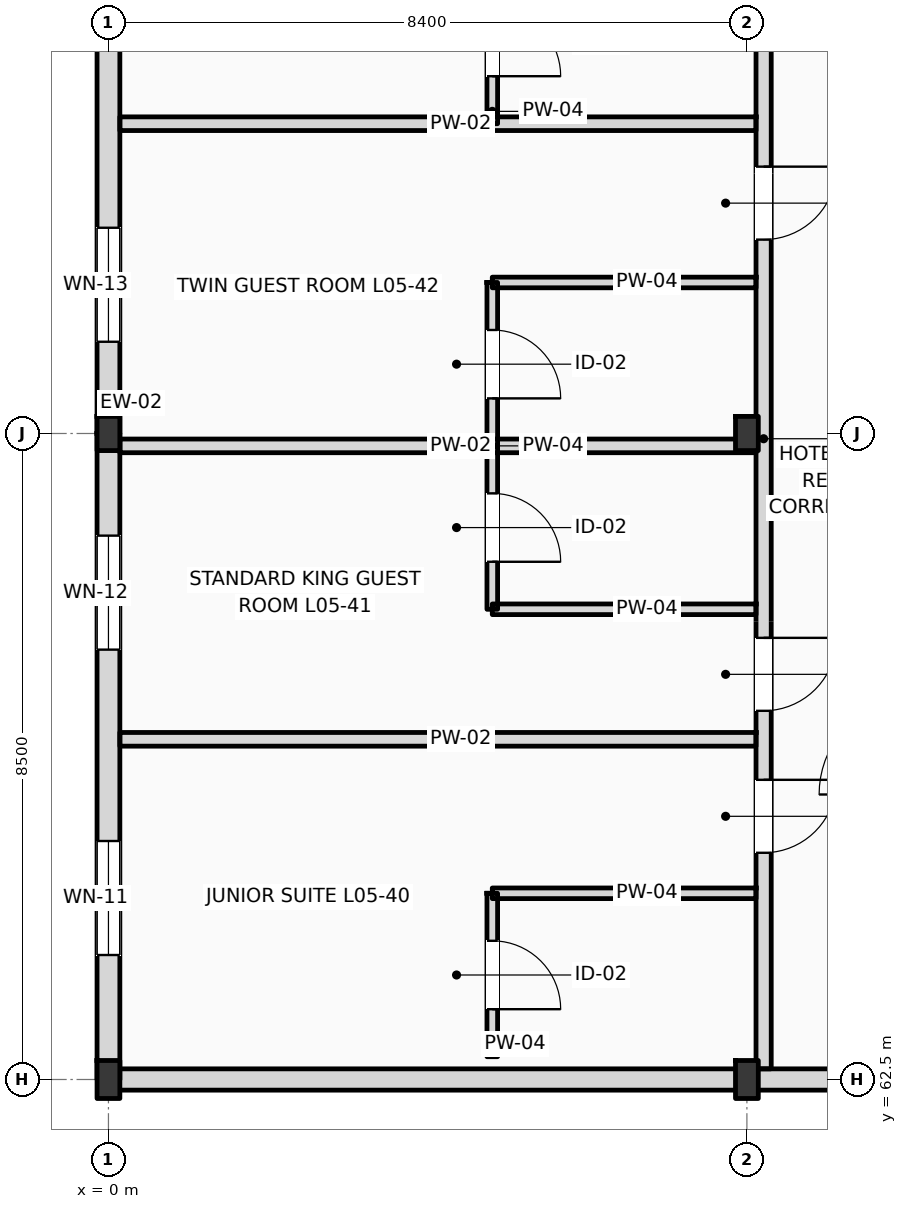
"""IFC4 building model, lengths in metres.
Left out: names, types, materials, properties, quantities, classifications, styles, units other than length and angle.
Written with IfcOpenShell. Run it as: python <this file> out.ifc"""

import sys

from ifc_helpers import new_model, si_unit, direction, frame, frame_2d, origin, origin_2d, place, context, subcontext, project, spatial, rectangle, i_section, extrude, element, fill, save


model = new_model("IFC4")
c1 = context("Model", 3, precision=1e-05, world=origin(), true_north=direction((0.0, 1.0)))
c2 = subcontext(c1, "Body", "Model", "MODEL_VIEW")
j1 = project(units=[si_unit("LENGTHUNIT", "METRE"), si_unit("PLANEANGLEUNIT", "RADIAN")], contexts=[c1])
p1 = place(None, origin())
s1 = spatial("IfcSite", under=j1, at=p1, CompositionType="ELEMENT")
p2 = place(p1, origin())
s2 = spatial("IfcBuilding", under=s1, at=p2, CompositionType="ELEMENT")
p3 = place(p2, frame((0.0, 0.0, 24.6)))
s3 = spatial("IfcBuildingStorey", under=s2, at=p3, CompositionType="ELEMENT", Elevation=24.6)
p4 = place(p3, frame((0.0, 62.5, 0.0), z_axis=(0.0, 0.0, 1.0), x_axis=(1.0, 0.0, 0.0)))
e1 = element("IfcColumn", 1, at=p4, inside=s3, PredefinedType="COLUMN", context=c2, shape_type="SweptSolid", body=[
    extrude(i_section(OverallWidth=0.3, OverallDepth=0.5, WebThickness=0.014, FlangeThickness=0.028, FilletRadius=0.027, at=origin_2d()), origin(), (0.0, 0.0, 1.0), 3.6),
])
p5 = place(p3, frame((0.0, 71.0, 0.0), z_axis=(0.0, 0.0, 1.0), x_axis=(1.0, 0.0, 0.0)))
e2 = element("IfcColumn", 2, at=p5, inside=s3, PredefinedType="COLUMN", context=c2, shape_type="SweptSolid", body=[
    extrude(i_section(OverallWidth=0.3, OverallDepth=0.45, WebThickness=0.014, FlangeThickness=0.026, FilletRadius=0.027, at=origin_2d()), origin(), (0.0, 0.0, 1.0), 3.6),
])
p6 = place(p3, frame((8.4, 62.5, 0.0), z_axis=(0.0, 0.0, 1.0), x_axis=(1.0, 0.0, 0.0)))
e3 = element("IfcColumn", 3, at=p6, inside=s3, PredefinedType="COLUMN", context=c2, shape_type="SweptSolid", body=[
    extrude(i_section(OverallWidth=0.3, OverallDepth=0.5, WebThickness=0.014, FlangeThickness=0.028, FilletRadius=0.027, at=origin_2d()), origin(), (0.0, 0.0, 1.0), 3.6),
])
p7 = place(p3, frame((8.4, 71.0, 0.0), z_axis=(0.0, 0.0, 1.0), x_axis=(1.0, 0.0, 0.0)))
e4 = element("IfcColumn", 4, at=p7, inside=s3, PredefinedType="COLUMN", context=c2, shape_type="SweptSolid", body=[
    extrude(i_section(OverallWidth=0.3, OverallDepth=0.45, WebThickness=0.014, FlangeThickness=0.026, FilletRadius=0.027, at=origin_2d()), origin(), (0.0, 0.0, 1.0), 3.6),
])
p8 = place(p3, frame((0.0, 62.5, 0.0), z_axis=(0.0, 0.0, 1.0), x_axis=(0.0, 1.0, 0.0)))
e5 = element("IfcWall", 5, at=p8, inside=s3, PredefinedType="STANDARD", context=c2, shape_type="SweptSolid", body=[
    extrude(rectangle(XDim=8.5, YDim=0.3, at=frame_2d((4.25, 0.0))), origin(), (0.0, 0.0, 1.0), 2.93),
])
p9 = place(p8, frame((1.638, 0.0, 0.9)))
e6 = element("IfcOpeningElement", 6, at=p9, cuts=e5, PredefinedType="OPENING", context=c2, shape_type="SweptSolid", body=[
    extrude(rectangle(XDim=1.5, YDim=1.85, at=frame_2d((0.75, 0.925))), frame((0.0, 0.16, 0.0), z_axis=(0.0, -1.0, 0.0), x_axis=(1.0, 0.0, 0.0)), (0.0, 0.0, 1.0), 0.32),
])
p10 = place(p8, frame((5.656, 0.0, 0.9)))
e7 = element("IfcOpeningElement", 7, at=p10, cuts=e5, PredefinedType="OPENING", context=c2, shape_type="SweptSolid", body=[
    extrude(rectangle(XDim=1.5, YDim=1.85, at=frame_2d((0.75, 0.925))), frame((0.0, 0.16, 0.0), z_axis=(0.0, -1.0, 0.0), x_axis=(1.0, 0.0, 0.0)), (0.0, 0.0, 1.0), 0.32),
])
p11 = place(p3, frame((0.0, 71.0, 0.0), z_axis=(0.0, 0.0, 1.0), x_axis=(0.0, 1.0, 0.0)))
e8 = element("IfcWall", 8, at=p11, inside=s3, PredefinedType="STANDARD", context=c2, shape_type="SweptSolid", body=[
    extrude(rectangle(XDim=8.5, YDim=0.3, at=frame_2d((4.25, 0.0))), origin(), (0.0, 0.0, 1.0), 2.93),
])
p12 = place(p11, frame((1.207, 0.0, 0.9)))
e9 = element("IfcOpeningElement", 9, at=p12, cuts=e8, PredefinedType="OPENING", context=c2, shape_type="SweptSolid", body=[
    extrude(rectangle(XDim=1.5, YDim=1.85, at=frame_2d((0.75, 0.925))), frame((0.0, 0.16, 0.0), z_axis=(0.0, -1.0, 0.0), x_axis=(1.0, 0.0, 0.0)), (0.0, 0.0, 1.0), 0.32),
])
p13 = place(p11, frame((5.256, 0.0, 0.9)))
e10 = element("IfcOpeningElement", 10, at=p13, cuts=e8, PredefinedType="OPENING", context=c2, shape_type="SweptSolid", body=[
    extrude(rectangle(XDim=1.5, YDim=1.85, at=frame_2d((0.75, 0.925))), frame((0.0, 0.16, 0.0), z_axis=(0.0, -1.0, 0.0), x_axis=(1.0, 0.0, 0.0)), (0.0, 0.0, 1.0), 0.32),
])
p14 = place(p3, frame((0.0, 62.5, 0.0), z_axis=(0.0, 0.0, 1.0), x_axis=(1.0, 0.0, 0.0)))
e11 = element("IfcWall", 11, at=p14, inside=s3, PredefinedType="STANDARD", context=c2, shape_type="SweptSolid", body=[
    extrude(rectangle(XDim=25.2, YDim=0.28, at=frame_2d((12.6, 0.0))), origin(), (0.0, 0.0, 1.0), 2.78),
])
p15 = place(p3, frame((8.62, 62.64, 0.0), z_axis=(0.0, 0.0, 1.0), x_axis=(0.0, 1.0, 0.0)))
e12 = element("IfcWall", 12, at=p15, inside=s3, PredefinedType="PARTITIONING", context=c2, shape_type="SweptSolid", body=[
    extrude(rectangle(XDim=32.66, YDim=0.2, at=frame_2d((16.33, 0.0))), origin(), (0.0, 0.0, 1.0), 2.93),
])
p16 = place(p15, frame((2.843, 0.0, 0.0)))
e13 = element("IfcOpeningElement", 13, at=p16, cuts=e12, PredefinedType="OPENING", context=c2, shape_type="SweptSolid", body=[
    extrude(rectangle(XDim=0.96, YDim=2.2, at=frame_2d((0.48, 1.1))), frame((0.0, 0.11, 0.0), z_axis=(0.0, -1.0, 0.0), x_axis=(1.0, 0.0, 0.0)), (0.0, 0.0, 1.0), 0.22),
])
p17 = place(p15, frame((4.711, 0.0, 0.0)))
e14 = element("IfcOpeningElement", 14, at=p17, cuts=e12, PredefinedType="OPENING", context=c2, shape_type="SweptSolid", body=[
    extrude(rectangle(XDim=0.96, YDim=2.2, at=frame_2d((0.48, 1.1))), frame((0.0, 0.11, 0.0), z_axis=(0.0, -1.0, 0.0), x_axis=(1.0, 0.0, 0.0)), (0.0, 0.0, 1.0), 0.22),
])
p18 = place(p15, frame((10.911, 0.0, 0.0)))
e15 = element("IfcOpeningElement", 15, at=p18, cuts=e12, PredefinedType="OPENING", context=c2, shape_type="SweptSolid", body=[
    extrude(rectangle(XDim=0.96, YDim=2.2, at=frame_2d((0.48, 1.1))), frame((0.0, 0.11, 0.0), z_axis=(0.0, -1.0, 0.0), x_axis=(1.0, 0.0, 0.0)), (0.0, 0.0, 1.0), 0.22),
])
p19 = place(p15, frame((14.961, 0.0, 0.0)))
e16 = element("IfcOpeningElement", 16, at=p19, cuts=e12, PredefinedType="OPENING", context=c2, shape_type="SweptSolid", body=[
    extrude(rectangle(XDim=0.96, YDim=2.2, at=frame_2d((0.48, 1.1))), frame((0.0, 0.11, 0.0), z_axis=(0.0, -1.0, 0.0), x_axis=(1.0, 0.0, 0.0)), (0.0, 0.0, 1.0), 0.22),
])
p20 = place(p15, frame((19.012, 0.0, 0.0)))
e17 = element("IfcOpeningElement", 17, at=p20, cuts=e12, PredefinedType="OPENING", context=c2, shape_type="SweptSolid", body=[
    extrude(rectangle(XDim=0.96, YDim=2.2, at=frame_2d((0.48, 1.1))), frame((0.0, 0.11, 0.0), z_axis=(0.0, -1.0, 0.0), x_axis=(1.0, 0.0, 0.0)), (0.0, 0.0, 1.0), 0.22),
])
p21 = place(p15, frame((23.061, 0.0, 0.0)))
e18 = element("IfcOpeningElement", 18, at=p21, cuts=e12, PredefinedType="OPENING", context=c2, shape_type="SweptSolid", body=[
    extrude(rectangle(XDim=0.96, YDim=2.2, at=frame_2d((0.48, 1.1))), frame((0.0, 0.11, 0.0), z_axis=(0.0, -1.0, 0.0), x_axis=(1.0, 0.0, 0.0)), (0.0, 0.0, 1.0), 0.22),
])
p22 = place(p15, frame((27.111, 0.0, 0.0)))
e19 = element("IfcOpeningElement", 19, at=p22, cuts=e12, PredefinedType="OPENING", context=c2, shape_type="SweptSolid", body=[
    extrude(rectangle(XDim=0.96, YDim=2.2, at=frame_2d((0.48, 1.1))), frame((0.0, 0.11, 0.0), z_axis=(0.0, -1.0, 0.0), x_axis=(1.0, 0.0, 0.0)), (0.0, 0.0, 1.0), 0.22),
])
p23 = place(p15, frame((31.193, 0.0, 0.0)))
e20 = element("IfcOpeningElement", 20, at=p23, cuts=e12, PredefinedType="OPENING", context=c2, shape_type="SweptSolid", body=[
    extrude(rectangle(XDim=0.96, YDim=2.2, at=frame_2d((0.48, 1.1))), frame((0.0, 0.11, 0.0), z_axis=(0.0, -1.0, 0.0), x_axis=(1.0, 0.0, 0.0)), (0.0, 0.0, 1.0), 0.22),
])
p24 = place(p3, frame((0.15, 66.976, 0.0), z_axis=(0.0, 0.0, 1.0), x_axis=(1.0, 0.0, 0.0)))
e21 = element("IfcWall", 21, at=p24, inside=s3, PredefinedType="PARTITIONING", context=c2, shape_type="SweptSolid", body=[
    extrude(rectangle(XDim=8.37, YDim=0.18, at=frame_2d((4.185, 0.0))), origin(), (0.0, 0.0, 1.0), 3.34),
])
p25 = place(p3, frame((5.05, 64.95, 0.0), z_axis=(0.0, 0.0, 1.0), x_axis=(1.0, 0.0, 0.0)))
e22 = element("IfcWall", 22, at=p25, inside=s3, PredefinedType="PARTITIONING", context=c2, shape_type="SweptSolid", body=[
    extrude(rectangle(XDim=3.47, YDim=0.14, at=frame_2d((1.735, 0.0))), origin(), (0.0, 0.0, 1.0), 3.34),
])
p26 = place(p3, frame((5.05, 62.8, 0.0), z_axis=(0.0, 0.0, 1.0), x_axis=(0.0, 1.0, 0.0)))
e23 = element("IfcWall", 23, at=p26, inside=s3, PredefinedType="PARTITIONING", context=c2, shape_type="SweptSolid", body=[
    extrude(rectangle(XDim=2.15, YDim=0.14, at=frame_2d((1.075, 0.0))), origin(), (0.0, 0.0, 1.0), 3.34),
])
p27 = place(p26, frame((0.625, 0.0, 0.0)))
e24 = element("IfcOpeningElement", 24, at=p27, cuts=e23, PredefinedType="OPENING", context=c2, shape_type="SweptSolid", body=[
    extrude(rectangle(XDim=0.9, YDim=2.1, at=frame_2d((0.45, 1.05))), frame((0.0, 0.08, 0.0), z_axis=(0.0, -1.0, 0.0), x_axis=(1.0, 0.0, 0.0)), (0.0, 0.0, 1.0), 0.16),
])
p28 = place(p3, frame((0.15, 70.837, 0.0), z_axis=(0.0, 0.0, 1.0), x_axis=(1.0, 0.0, 0.0)))
e25 = element("IfcWall", 25, at=p28, inside=s3, PredefinedType="PARTITIONING", context=c2, shape_type="SweptSolid", body=[
    extrude(rectangle(XDim=8.37, YDim=0.18, at=frame_2d((4.185, 0.0))), origin(), (0.0, 0.0, 1.0), 2.78),
])
p29 = place(p3, frame((5.05, 68.687, 0.0), z_axis=(0.0, 0.0, 1.0), x_axis=(1.0, 0.0, 0.0)))
e26 = element("IfcWall", 26, at=p29, inside=s3, PredefinedType="PARTITIONING", context=c2, shape_type="SweptSolid", body=[
    extrude(rectangle(XDim=3.47, YDim=0.14, at=frame_2d((1.735, 0.0))), origin(), (0.0, 0.0, 1.0), 3.34),
])
p30 = place(p3, frame((5.05, 68.687, 0.0), z_axis=(0.0, 0.0, 1.0), x_axis=(0.0, 1.0, 0.0)))
e27 = element("IfcWall", 27, at=p30, inside=s3, PredefinedType="PARTITIONING", context=c2, shape_type="SweptSolid", body=[
    extrude(rectangle(XDim=2.15, YDim=0.14, at=frame_2d((1.075, 0.0))), origin(), (0.0, 0.0, 1.0), 3.34),
])
p31 = place(p30, frame((0.625, 0.0, 0.0)))
e28 = element("IfcOpeningElement", 28, at=p31, cuts=e27, PredefinedType="OPENING", context=c2, shape_type="SweptSolid", body=[
    extrude(rectangle(XDim=0.9, YDim=2.1, at=frame_2d((0.45, 1.05))), frame((0.0, 0.08, 0.0), z_axis=(0.0, -1.0, 0.0), x_axis=(1.0, 0.0, 0.0)), (0.0, 0.0, 1.0), 0.16),
])
p32 = place(p3, frame((0.15, 75.076, 0.0), z_axis=(0.0, 0.0, 1.0), x_axis=(1.0, 0.0, 0.0)))
e29 = element("IfcWall", 29, at=p32, inside=s3, PredefinedType="PARTITIONING", context=c2, shape_type="SweptSolid", body=[
    extrude(rectangle(XDim=8.37, YDim=0.18, at=frame_2d((4.185, 0.0))), origin(), (0.0, 0.0, 1.0), 3.34),
])
p33 = place(p3, frame((5.05, 72.987, 0.0), z_axis=(0.0, 0.0, 1.0), x_axis=(1.0, 0.0, 0.0)))
e30 = element("IfcWall", 30, at=p33, inside=s3, PredefinedType="PARTITIONING", context=c2, shape_type="SweptSolid", body=[
    extrude(rectangle(XDim=3.47, YDim=0.14, at=frame_2d((1.735, 0.0))), origin(), (0.0, 0.0, 1.0), 3.34),
])
p34 = place(p3, frame((5.05, 70.837, 0.0), z_axis=(0.0, 0.0, 1.0), x_axis=(0.0, 1.0, 0.0)))
e31 = element("IfcWall", 31, at=p34, inside=s3, PredefinedType="PARTITIONING", context=c2, shape_type="SweptSolid", body=[
    extrude(rectangle(XDim=2.15, YDim=0.14, at=frame_2d((1.075, 0.0))), origin(), (0.0, 0.0, 1.0), 3.34),
])
p35 = place(p34, frame((0.625, 0.0, 0.0)))
e32 = element("IfcOpeningElement", 32, at=p35, cuts=e31, PredefinedType="OPENING", context=c2, shape_type="SweptSolid", body=[
    extrude(rectangle(XDim=0.9, YDim=2.1, at=frame_2d((0.45, 1.05))), frame((0.0, 0.08, 0.0), z_axis=(0.0, -1.0, 0.0), x_axis=(1.0, 0.0, 0.0)), (0.0, 0.0, 1.0), 0.16),
])
p36 = place(p3, frame((5.05, 75.076, 0.0), z_axis=(0.0, 0.0, 1.0), x_axis=(0.0, 1.0, 0.0)))
e33 = element("IfcWall", 33, at=p36, inside=s3, PredefinedType="PARTITIONING", context=c2, shape_type="SweptSolid", body=[
    extrude(rectangle(XDim=2.15, YDim=0.14, at=frame_2d((1.075, 0.0))), origin(), (0.0, 0.0, 1.0), 3.34),
])
p37 = place(p36, frame((0.625, 0.0, 0.0)))
e34 = element("IfcOpeningElement", 34, at=p37, cuts=e33, PredefinedType="OPENING", context=c2, shape_type="SweptSolid", body=[
    extrude(rectangle(XDim=0.9, YDim=2.1, at=frame_2d((0.45, 1.05))), frame((0.0, 0.08, 0.0), z_axis=(0.0, -1.0, 0.0), x_axis=(1.0, 0.0, 0.0)), (0.0, 0.0, 1.0), 0.16),
])
p38 = place(p9, origin())
e35 = element("IfcWindow", 35, at=p38, inside=s3, PartitioningType="DOUBLE_PANEL_VERTICAL", PredefinedType="WINDOW", context=c2, shape_type="SweptSolid", body=[
    extrude(rectangle(XDim=1.5, YDim=1.85, at=frame_2d((0.75, 0.925))), frame((0.0, 0.03, 0.0), z_axis=(0.0, -1.0, 0.0), x_axis=(1.0, 0.0, 0.0)), (0.0, 0.0, 1.0), 0.06),
])
fill(e6, e35)
p39 = place(p10, origin())
e36 = element("IfcWindow", 36, at=p39, inside=s3, PartitioningType="DOUBLE_PANEL_VERTICAL", PredefinedType="WINDOW", context=c2, shape_type="SweptSolid", body=[
    extrude(rectangle(XDim=1.5, YDim=1.85, at=frame_2d((0.75, 0.925))), frame((0.0, 0.03, 0.0), z_axis=(0.0, -1.0, 0.0), x_axis=(1.0, 0.0, 0.0)), (0.0, 0.0, 1.0), 0.06),
])
fill(e7, e36)
p40 = place(p12, origin())
e37 = element("IfcWindow", 37, at=p40, inside=s3, PartitioningType="DOUBLE_PANEL_VERTICAL", PredefinedType="WINDOW", context=c2, shape_type="SweptSolid", body=[
    extrude(rectangle(XDim=1.5, YDim=1.85, at=frame_2d((0.75, 0.925))), frame((0.0, 0.03, 0.0), z_axis=(0.0, -1.0, 0.0), x_axis=(1.0, 0.0, 0.0)), (0.0, 0.0, 1.0), 0.06),
])
fill(e9, e37)
p41 = place(p16, frame((0.96, 0.0, 0.0), z_axis=(0.0, 0.0, 1.0), x_axis=(-1.0, 0.0, 0.0)))
e38 = element("IfcDoor", 38, at=p41, inside=s3, OperationType="SINGLE_SWING_RIGHT", PredefinedType="DOOR", context=c2, shape_type="SweptSolid", body=[
    extrude(rectangle(XDim=0.96, YDim=2.2, at=frame_2d((0.48, 1.1))), frame((0.0, 0.025, 0.0), z_axis=(0.0, -1.0, 0.0), x_axis=(1.0, 0.0, 0.0)), (0.0, 0.0, 1.0), 0.05),
])
fill(e13, e38)
p42 = place(p27, frame((0.9, 0.0, 0.0), z_axis=(0.0, 0.0, 1.0), x_axis=(-1.0, 0.0, 0.0)))
e39 = element("IfcDoor", 39, at=p42, inside=s3, OperationType="SINGLE_SWING_LEFT", PredefinedType="DOOR", context=c2, shape_type="SweptSolid", body=[
    extrude(rectangle(XDim=0.9, YDim=2.1, at=frame_2d((0.45, 1.05))), frame((0.0, 0.025, 0.0), z_axis=(0.0, -1.0, 0.0), x_axis=(1.0, 0.0, 0.0)), (0.0, 0.0, 1.0), 0.05),
])
fill(e24, e39)
p43 = place(p17, frame((0.96, 0.0, 0.0), z_axis=(0.0, 0.0, 1.0), x_axis=(-1.0, 0.0, 0.0)))
e40 = element("IfcDoor", 40, at=p43, inside=s3, OperationType="SINGLE_SWING_RIGHT", PredefinedType="DOOR", context=c2, shape_type="SweptSolid", body=[
    extrude(rectangle(XDim=0.96, YDim=2.2, at=frame_2d((0.48, 1.1))), frame((0.0, 0.025, 0.0), z_axis=(0.0, -1.0, 0.0), x_axis=(1.0, 0.0, 0.0)), (0.0, 0.0, 1.0), 0.05),
])
fill(e14, e40)
p44 = place(p31, frame((0.9, 0.0, 0.0), z_axis=(0.0, 0.0, 1.0), x_axis=(-1.0, 0.0, 0.0)))
e41 = element("IfcDoor", 41, at=p44, inside=s3, OperationType="SINGLE_SWING_LEFT", PredefinedType="DOOR", context=c2, shape_type="SweptSolid", body=[
    extrude(rectangle(XDim=0.9, YDim=2.1, at=frame_2d((0.45, 1.05))), frame((0.0, 0.025, 0.0), z_axis=(0.0, -1.0, 0.0), x_axis=(1.0, 0.0, 0.0)), (0.0, 0.0, 1.0), 0.05),
])
fill(e28, e41)
p45 = place(p18, frame((0.96, 0.0, 0.0), z_axis=(0.0, 0.0, 1.0), x_axis=(-1.0, 0.0, 0.0)))
e42 = element("IfcDoor", 42, at=p45, inside=s3, OperationType="SINGLE_SWING_RIGHT", PredefinedType="DOOR", context=c2, shape_type="SweptSolid", body=[
    extrude(rectangle(XDim=0.96, YDim=2.2, at=frame_2d((0.48, 1.1))), frame((0.0, 0.025, 0.0), z_axis=(0.0, -1.0, 0.0), x_axis=(1.0, 0.0, 0.0)), (0.0, 0.0, 1.0), 0.05),
])
fill(e15, e42)
p46 = place(p35, frame((0.9, 0.0, 0.0), z_axis=(0.0, 0.0, 1.0), x_axis=(-1.0, 0.0, 0.0)))
e43 = element("IfcDoor", 43, at=p46, inside=s3, OperationType="SINGLE_SWING_LEFT", PredefinedType="DOOR", context=c2, shape_type="SweptSolid", body=[
    extrude(rectangle(XDim=0.9, YDim=2.1, at=frame_2d((0.45, 1.05))), frame((0.0, 0.025, 0.0), z_axis=(0.0, -1.0, 0.0), x_axis=(1.0, 0.0, 0.0)), (0.0, 0.0, 1.0), 0.05),
])
fill(e32, e43)
p47 = place(p37, frame((0.9, 0.0, 0.0), z_axis=(0.0, 0.0, 1.0), x_axis=(-1.0, 0.0, 0.0)))
e44 = element("IfcDoor", 44, at=p47, inside=s3, OperationType="SINGLE_SWING_LEFT", PredefinedType="DOOR", context=c2, shape_type="SweptSolid", body=[
    extrude(rectangle(XDim=0.9, YDim=2.1, at=frame_2d((0.45, 1.05))), frame((0.0, 0.025, 0.0), z_axis=(0.0, -1.0, 0.0), x_axis=(1.0, 0.0, 0.0)), (0.0, 0.0, 1.0), 0.05),
])
fill(e34, e44)
save(model, sys.argv[1])
